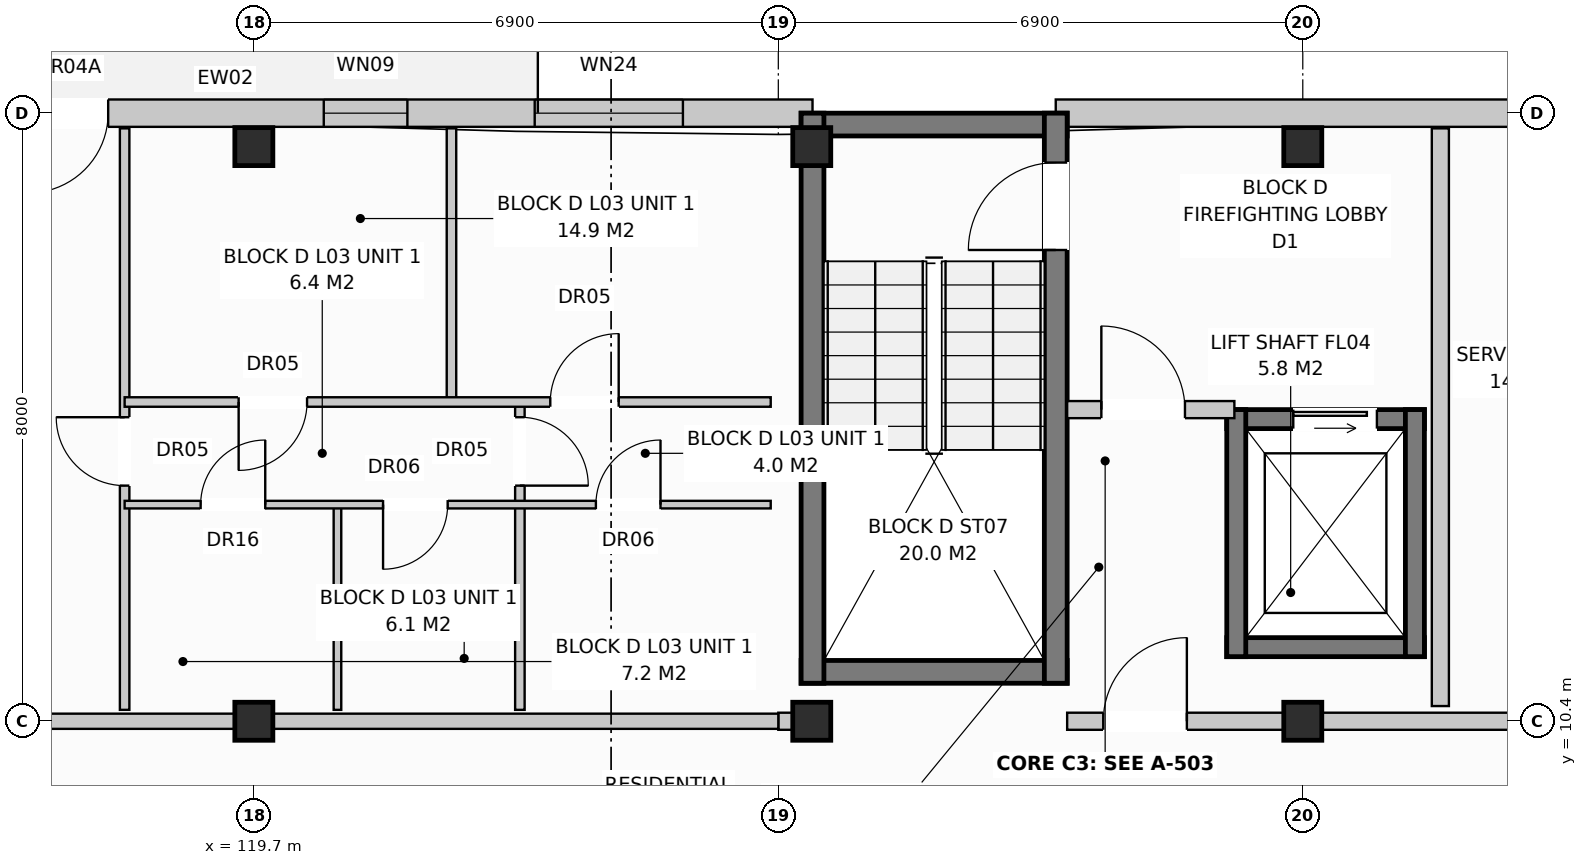
"""IFC4 building model, lengths in metres.
Left out: names, types, materials, properties, quantities, classifications, styles, units other than length and angle.
Written with IfcOpenShell. Run it as: python <this file> out.ifc"""

import sys

from ifc_helpers import new_model, si_unit, direction, frame, frame_2d, origin, origin_with_axes, origin_2d, place, context, subcontext, project, spatial, rectangle, extrude, element, fill, save


model = new_model("IFC4")
c1 = context("Model", 3, precision=1e-05, world=origin(), true_north=direction((0.0, 1.0)))
c2 = subcontext(c1, "Body", "Model", "MODEL_VIEW")
j1 = project(units=[si_unit("LENGTHUNIT", "METRE"), si_unit("PLANEANGLEUNIT", "RADIAN")], contexts=[c1])
p1 = place(None, origin())
s1 = spatial("IfcSite", under=j1, at=p1, CompositionType="ELEMENT")
p2 = place(p1, origin())
s2 = spatial("IfcBuilding", under=s1, at=p2, CompositionType="ELEMENT")
p3 = place(p2, frame((0.0, 0.0, 11.2)))
s3 = spatial("IfcBuildingStorey", under=s2, at=p3, CompositionType="ELEMENT", Elevation=11.2)
for number, where, z_axis, x_axis in (
    (1, (119.7, 10.4, 0.0), (0.0, 0.0, 1.0), (1.0, 0.0, 0.0)),
    (2, (119.7, 17.96, 0.0), (0.0, 0.0, 1.0), (1.0, 0.0, 0.0)),
    (3, (127.04, 10.4, 0.0), (0.0, 0.0, 1.0), (1.0, 0.0, 0.0)),
    (4, (127.04, 17.96, 0.0), (0.0, 0.0, 1.0), (1.0, 0.0, 0.0)),
    (5, (133.5, 10.4, 0.0), (0.0, 0.0, 1.0), (1.0, 0.0, 0.0)),
    (6, (133.5, 17.96, 0.0), (0.0, 0.0, 1.0), (1.0, 0.0, 0.0)),
):
    element("IfcColumn", number, at=place(p3, frame(where, z_axis=z_axis, x_axis=x_axis)), inside=s3, PredefinedType="COLUMN", context=c2, shape_type="SweptSolid", body=[
        extrude(rectangle(XDim=0.5, YDim=0.5, at=origin_2d()), origin(), (0.0, 0.0, 1.0), 3.2),
    ])
p4 = place(p3, frame((112.97, 18.4, 0.0), z_axis=(0.0, 0.0, 1.0), x_axis=(1.0, 0.0, 0.0)))
e7 = element("IfcWall", 7, at=p4, inside=s3, PredefinedType="STANDARD", context=c2, shape_type="SweptSolid", body=[
    extrude(rectangle(XDim=14.08, YDim=0.36, at=frame_2d((7.04, 0.0))), origin(), (0.0, 0.0, 1.0), 2.94),
])
p5 = place(p4, frame((3.764, 0.0, 0.0)))
e8 = element("IfcOpeningElement", 8, at=p5, cuts=e7, PredefinedType="OPENING", context=c2, shape_type="SweptSolid", body=[
    extrude(rectangle(XDim=1.05, YDim=2.12, at=frame_2d((0.525, 1.06))), frame((0.0, 0.192, 0.0), z_axis=(0.0, -1.0, 0.0), x_axis=(1.0, 0.0, 0.0)), (0.0, 0.0, 1.0), 0.384),
])
p6 = place(p4, frame((1.6, 0.0, 0.8)))
e9 = element("IfcOpeningElement", 9, at=p6, cuts=e7, PredefinedType="OPENING", context=c2, shape_type="SweptSolid", body=[
    extrude(rectangle(XDim=1.8, YDim=1.7, at=frame_2d((0.9, 0.85))), frame((0.0, 0.192, 0.0), z_axis=(0.0, -1.0, 0.0), x_axis=(1.0, 0.0, 0.0)), (0.0, 0.0, 1.0), 0.384),
])
p7 = place(p4, frame((7.65, 0.0, 0.72)))
e10 = element("IfcOpeningElement", 10, at=p7, cuts=e7, PredefinedType="OPENING", context=c2, shape_type="SweptSolid", body=[
    extrude(rectangle(XDim=1.1, YDim=1.5, at=frame_2d((0.55, 0.75))), frame((0.0, 0.192, 0.0), z_axis=(0.0, -1.0, 0.0), x_axis=(1.0, 0.0, 0.0)), (0.0, 0.0, 1.0), 0.384),
])
p8 = place(p4, frame((10.425, 0.0, 0.8)))
e11 = element("IfcOpeningElement", 11, at=p8, cuts=e7, PredefinedType="OPENING", context=c2, shape_type="SweptSolid", body=[
    extrude(rectangle(XDim=1.95, YDim=1.65, at=frame_2d((0.975, 0.825))), frame((0.0, 0.192, 0.0), z_axis=(0.0, -1.0, 0.0), x_axis=(1.0, 0.0, 0.0)), (0.0, 0.0, 1.0), 0.384),
])
p9 = place(p3, frame((130.25, 18.4, 0.0), z_axis=(0.0, 0.0, 1.0), x_axis=(1.0, 0.0, 0.0)))
e12 = element("IfcWall", 12, at=p9, inside=s3, PredefinedType="STANDARD", context=c2, shape_type="SweptSolid", body=[
    extrude(rectangle(XDim=17.5, YDim=0.36, at=frame_2d((8.75, 0.0))), origin(), (0.0, 0.0, 1.0), 2.94),
])
p10 = place(p9, frame((11.949, 0.0, 0.0)))
e13 = element("IfcOpeningElement", 13, at=p10, cuts=e12, PredefinedType="OPENING", context=c2, shape_type="SweptSolid", body=[
    extrude(rectangle(XDim=1.05, YDim=2.12, at=frame_2d((0.525, 1.06))), frame((0.0, 0.192, 0.0), z_axis=(0.0, -1.0, 0.0), x_axis=(1.0, 0.0, 0.0)), (0.0, 0.0, 1.0), 0.384),
])
p11 = place(p9, frame((14.97, 0.0, 0.72)))
e14 = element("IfcOpeningElement", 14, at=p11, cuts=e12, PredefinedType="OPENING", context=c2, shape_type="SweptSolid", body=[
    extrude(rectangle(XDim=1.1, YDim=1.5, at=frame_2d((0.55, 0.75))), frame((0.0, 0.192, 0.0), z_axis=(0.0, -1.0, 0.0), x_axis=(1.0, 0.0, 0.0)), (0.0, 0.0, 1.0), 0.384),
])
for number, where, z_axis, x_axis in (
    (15, (126.9, 18.25, 0.0), (0.0, 0.0, 1.0), (1.0, 0.0, 0.0)),
    (16, (126.9, 11.05, 0.0), (0.0, 0.0, 1.0), (1.0, 0.0, 0.0)),
):
    element("IfcWall", number, at=place(p3, frame(where, z_axis=z_axis, x_axis=x_axis)), inside=s3, PredefinedType="SHEAR", context=c2, shape_type="SweptSolid", body=[
        extrude(rectangle(XDim=3.5, YDim=0.3, at=frame_2d((1.75, 0.0))), origin(), (0.0, 0.0, 1.0), 2.94),
    ])
p12 = place(p3, frame((127.05, 10.9, 0.0), z_axis=(0.0, 0.0, 1.0), x_axis=(0.0, 1.0, 0.0)))
e17 = element("IfcWall", 17, at=p12, inside=s3, PredefinedType="SHEAR", context=c2, shape_type="SweptSolid", body=[
    extrude(rectangle(XDim=7.5, YDim=0.3, at=frame_2d((3.75, 0.0))), origin(), (0.0, 0.0, 1.0), 2.94),
])
p13 = place(p3, frame((130.25, 10.9, 0.0), z_axis=(0.0, 0.0, 1.0), x_axis=(0.0, 1.0, 0.0)))
e18 = element("IfcWall", 18, at=p13, inside=s3, PredefinedType="SHEAR", context=c2, shape_type="SweptSolid", body=[
    extrude(rectangle(XDim=7.5, YDim=0.3, at=frame_2d((3.75, 0.0))), origin(), (0.0, 0.0, 1.0), 2.94),
])
p14 = place(p13, frame((5.7, 0.0, 0.0)))
e19 = element("IfcOpeningElement", 19, at=p14, cuts=e18, PredefinedType="OPENING", context=c2, shape_type="SweptSolid", body=[
    extrude(rectangle(XDim=1.15, YDim=2.15, at=frame_2d((0.575, 1.075))), frame((0.0, 0.162, 0.0), z_axis=(0.0, -1.0, 0.0), x_axis=(1.0, 0.0, 0.0)), (0.0, 0.0, 1.0), 0.324),
])
p15 = place(p3, frame((132.5, 14.375, 0.0), z_axis=(0.0, 0.0, 1.0), x_axis=(1.0, 0.0, 0.0)))
e20 = element("IfcWall", 20, at=p15, inside=s3, PredefinedType="SHEAR", context=c2, shape_type="SweptSolid", body=[
    extrude(rectangle(XDim=2.6, YDim=0.25, at=frame_2d((1.3, 0.0))), origin(), (0.0, 0.0, 1.0), 2.94),
])
p16 = place(p15, frame((0.875, 0.0, 0.0)))
e21 = element("IfcOpeningElement", 21, at=p16, cuts=e20, PredefinedType="OPENING", context=c2, shape_type="SweptSolid", body=[
    extrude(rectangle(XDim=1.1, YDim=2.1, at=frame_2d((0.55, 1.05))), frame((0.0, 0.137, 0.0), z_axis=(0.0, -1.0, 0.0), x_axis=(1.0, 0.0, 0.0)), (0.0, 0.0, 1.0), 0.274),
])
p17 = place(p3, frame((132.5, 11.375, 0.0), z_axis=(0.0, 0.0, 1.0), x_axis=(1.0, 0.0, 0.0)))
e22 = element("IfcWall", 22, at=p17, inside=s3, PredefinedType="SHEAR", context=c2, shape_type="SweptSolid", body=[
    extrude(rectangle(XDim=2.6, YDim=0.25, at=frame_2d((1.3, 0.0))), origin(), (0.0, 0.0, 1.0), 2.94),
])
for number, where, z_axis, x_axis in (
    (23, (132.625, 11.25, 0.0), (0.0, 0.0, 1.0), (0.0, 1.0, 0.0)),
    (24, (134.975, 11.25, 0.0), (0.0, 0.0, 1.0), (0.0, 1.0, 0.0)),
):
    element("IfcWall", number, at=place(p3, frame(where, z_axis=z_axis, x_axis=x_axis)), inside=s3, PredefinedType="SHEAR", context=c2, shape_type="SweptSolid", body=[
        extrude(rectangle(XDim=3.25, YDim=0.25, at=frame_2d((1.625, 0.0))), origin(), (0.0, 0.0, 1.0), 2.94),
    ])
p18 = place(p3, frame((135.31, 10.6, 0.0), z_axis=(0.0, 0.0, 1.0), x_axis=(0.0, 1.0, 0.0)))
e25 = element("IfcWall", 25, at=p18, inside=s3, PredefinedType="PARTITIONING", context=c2, shape_type="SweptSolid", body=[
    extrude(rectangle(XDim=7.6, YDim=0.225, at=frame_2d((3.8, 0.0))), origin(), (0.0, 0.0, 1.0), 2.59),
])
p19 = place(p3, frame((130.4, 14.5, 0.0), z_axis=(0.0, 0.0, 1.0), x_axis=(1.0, 0.0, 0.0)))
e26 = element("IfcWall", 26, at=p19, inside=s3, PredefinedType="PARTITIONING", context=c2, shape_type="SweptSolid", body=[
    extrude(rectangle(XDim=2.2, YDim=0.225, at=frame_2d((1.1, 0.0))), origin(), (0.0, 0.0, 1.0), 2.94),
])
p20 = place(p19, frame((0.45, 0.0, 0.0)))
e27 = element("IfcOpeningElement", 27, at=p20, cuts=e26, PredefinedType="OPENING", context=c2, shape_type="SweptSolid", body=[
    extrude(rectangle(XDim=1.1, YDim=2.15, at=frame_2d((0.55, 1.075))), frame((0.0, 0.125, 0.0), z_axis=(0.0, -1.0, 0.0), x_axis=(1.0, 0.0, 0.0)), (0.0, 0.0, 1.0), 0.249),
])
p21 = place(p3, frame((126.6, 10.4, 0.0), z_axis=(0.0, 0.0, 1.0), x_axis=(1.0, 0.0, 0.0)))
e28 = element("IfcWall", 28, at=p21, inside=s3, PredefinedType="PARTITIONING", context=c2, shape_type="SweptSolid", body=[
    extrude(rectangle(XDim=0.3, YDim=0.225, at=frame_2d((0.15, 0.0))), origin(), (0.0, 0.0, 1.0), 2.94),
])
p22 = place(p3, frame((130.4, 10.4, 0.0), z_axis=(0.0, 0.0, 1.0), x_axis=(1.0, 0.0, 0.0)))
e29 = element("IfcWall", 29, at=p22, inside=s3, PredefinedType="PARTITIONING", context=c2, shape_type="SweptSolid", body=[
    extrude(rectangle(XDim=10.0, YDim=0.225, at=frame_2d((5.0, 0.0))), origin(), (0.0, 0.0, 1.0), 2.38),
])
p23 = place(p22, frame((0.475, 0.0, 0.0)))
e30 = element("IfcOpeningElement", 30, at=p23, cuts=e29, PredefinedType="OPENING", context=c2, shape_type="SweptSolid", body=[
    extrude(rectangle(XDim=1.1, YDim=2.15, at=frame_2d((0.55, 1.075))), frame((0.0, 0.125, 0.0), z_axis=(0.0, -1.0, 0.0), x_axis=(1.0, 0.0, 0.0)), (0.0, 0.0, 1.0), 0.249),
])
p24 = place(p22, frame((5.85, 0.0, 0.0)))
e31 = element("IfcOpeningElement", 31, at=p24, cuts=e29, PredefinedType="OPENING", context=c2, shape_type="SweptSolid", body=[
    extrude(rectangle(XDim=0.9, YDim=2.1, at=frame_2d((0.45, 1.05))), frame((0.0, 0.125, 0.0), z_axis=(0.0, -1.0, 0.0), x_axis=(1.0, 0.0, 0.0)), (0.0, 0.0, 1.0), 0.249),
])
p25 = place(p22, frame((7.9, 0.0, 0.0)))
e32 = element("IfcOpeningElement", 32, at=p25, cuts=e29, PredefinedType="OPENING", context=c2, shape_type="SweptSolid", body=[
    extrude(rectangle(XDim=0.95, YDim=2.15, at=frame_2d((0.475, 1.075))), frame((0.0, 0.125, 0.0), z_axis=(0.0, -1.0, 0.0), x_axis=(1.0, 0.0, 0.0)), (0.0, 0.0, 1.0), 0.249),
])
p26 = place(p3, frame((112.8, 10.4, 0.0), z_axis=(0.0, 0.0, 1.0), x_axis=(1.0, 0.0, 0.0)))
e33 = element("IfcWall", 33, at=p26, inside=s3, PredefinedType="PARTITIONING", context=c2, shape_type="SweptSolid", body=[
    extrude(rectangle(XDim=13.8, YDim=0.2, at=frame_2d((6.9, 0.0))), origin(), (0.0, 0.0, 1.0), 2.38),
])
p27 = place(p26, frame((2.4, 0.0, 0.0)))
e34 = element("IfcOpeningElement", 34, at=p27, cuts=e33, PredefinedType="OPENING", context=c2, shape_type="SweptSolid", body=[
    extrude(rectangle(XDim=0.95, YDim=2.15, at=frame_2d((0.475, 1.075))), frame((0.0, 0.112, 0.0), z_axis=(0.0, -1.0, 0.0), x_axis=(1.0, 0.0, 0.0)), (0.0, 0.0, 1.0), 0.224),
])
p28 = place(p3, frame((118.0, 10.55, 0.0), z_axis=(0.0, 0.0, 1.0), x_axis=(0.0, 1.0, 0.0)))
e35 = element("IfcWall", 35, at=p28, inside=s3, PredefinedType="PARTITIONING", context=c2, shape_type="SweptSolid", body=[
    extrude(rectangle(XDim=7.65, YDim=0.125, at=frame_2d((3.825, 0.0))), origin(), (0.0, 0.0, 1.0), 2.94),
])
p29 = place(p28, frame((2.95, 0.0, 0.0)))
e36 = element("IfcOpeningElement", 36, at=p29, cuts=e35, PredefinedType="OPENING", context=c2, shape_type="SweptSolid", body=[
    extrude(rectangle(XDim=0.9, YDim=2.1, at=frame_2d((0.45, 1.05))), frame((0.0, 0.074, 0.0), z_axis=(0.0, -1.0, 0.0), x_axis=(1.0, 0.0, 0.0)), (0.0, 0.0, 1.0), 0.149),
])
p30 = place(p3, frame((120.8, 10.55, 0.0), z_axis=(0.0, 0.0, 1.0), x_axis=(0.0, 1.0, 0.0)))
e37 = element("IfcWall", 37, at=p30, inside=s3, PredefinedType="PARTITIONING", context=c2, shape_type="SweptSolid", body=[
    extrude(rectangle(XDim=2.7, YDim=0.1, at=frame_2d((1.35, 0.0))), origin(), (0.0, 0.0, 1.0), 2.94),
])
p31 = place(p3, frame((123.2, 10.55, 0.0), z_axis=(0.0, 0.0, 1.0), x_axis=(0.0, 1.0, 0.0)))
e38 = element("IfcWall", 38, at=p31, inside=s3, PredefinedType="PARTITIONING", context=c2, shape_type="SweptSolid", body=[
    extrude(rectangle(XDim=4.05, YDim=0.125, at=frame_2d((2.025, 0.0))), origin(), (0.0, 0.0, 1.0), 2.94),
])
p32 = place(p31, frame((2.95, 0.0, 0.0)))
e39 = element("IfcOpeningElement", 39, at=p32, cuts=e38, PredefinedType="OPENING", context=c2, shape_type="SweptSolid", body=[
    extrude(rectangle(XDim=0.9, YDim=2.1, at=frame_2d((0.45, 1.05))), frame((0.0, 0.074, 0.0), z_axis=(0.0, -1.0, 0.0), x_axis=(1.0, 0.0, 0.0)), (0.0, 0.0, 1.0), 0.149),
])
p33 = place(p3, frame((122.3, 14.6, 0.0), z_axis=(0.0, 0.0, 1.0), x_axis=(0.0, 1.0, 0.0)))
e40 = element("IfcWall", 40, at=p33, inside=s3, PredefinedType="PARTITIONING", context=c2, shape_type="SweptSolid", body=[
    extrude(rectangle(XDim=3.6, YDim=0.125, at=frame_2d((1.8, 0.0))), origin(), (0.0, 0.0, 1.0), 2.59),
])
p34 = place(p3, frame((118.0, 13.25, 0.0), z_axis=(0.0, 0.0, 1.0), x_axis=(1.0, 0.0, 0.0)))
e41 = element("IfcWall", 41, at=p34, inside=s3, PredefinedType="PARTITIONING", context=c2, shape_type="SweptSolid", body=[
    extrude(rectangle(XDim=8.5, YDim=0.1, at=frame_2d((4.25, 0.0))), origin(), (0.0, 0.0, 1.0), 2.94),
])
p35 = place(p34, frame((1.0, 0.0, 0.0)))
e42 = element("IfcOpeningElement", 42, at=p35, cuts=e41, PredefinedType="OPENING", context=c2, shape_type="SweptSolid", body=[
    extrude(rectangle(XDim=0.85, YDim=2.1, at=frame_2d((0.425, 1.05))), frame((0.0, 0.062, 0.0), z_axis=(0.0, -1.0, 0.0), x_axis=(1.0, 0.0, 0.0)), (0.0, 0.0, 1.0), 0.124),
])
p36 = place(p34, frame((3.4, 0.0, 0.0)))
e43 = element("IfcOpeningElement", 43, at=p36, cuts=e41, PredefinedType="OPENING", context=c2, shape_type="SweptSolid", body=[
    extrude(rectangle(XDim=0.85, YDim=2.05, at=frame_2d((0.425, 1.025))), frame((0.0, 0.062, 0.0), z_axis=(0.0, -1.0, 0.0), x_axis=(1.0, 0.0, 0.0)), (0.0, 0.0, 1.0), 0.124),
])
p37 = place(p34, frame((6.2, 0.0, 0.0)))
e44 = element("IfcOpeningElement", 44, at=p37, cuts=e41, PredefinedType="OPENING", context=c2, shape_type="SweptSolid", body=[
    extrude(rectangle(XDim=0.85, YDim=2.05, at=frame_2d((0.425, 1.025))), frame((0.0, 0.062, 0.0), z_axis=(0.0, -1.0, 0.0), x_axis=(1.0, 0.0, 0.0)), (0.0, 0.0, 1.0), 0.124),
])
p38 = place(p3, frame((118.0, 14.6, 0.0), z_axis=(0.0, 0.0, 1.0), x_axis=(1.0, 0.0, 0.0)))
e45 = element("IfcWall", 45, at=p38, inside=s3, PredefinedType="PARTITIONING", context=c2, shape_type="SweptSolid", body=[
    extrude(rectangle(XDim=8.5, YDim=0.125, at=frame_2d((4.25, 0.0))), origin(), (0.0, 0.0, 1.0), 2.94),
])
p39 = place(p38, frame((1.5, 0.0, 0.0)))
e46 = element("IfcOpeningElement", 46, at=p39, cuts=e45, PredefinedType="OPENING", context=c2, shape_type="SweptSolid", body=[
    extrude(rectangle(XDim=0.9, YDim=2.1, at=frame_2d((0.45, 1.05))), frame((0.0, 0.074, 0.0), z_axis=(0.0, -1.0, 0.0), x_axis=(1.0, 0.0, 0.0)), (0.0, 0.0, 1.0), 0.149),
])
p40 = place(p38, frame((5.6, 0.0, 0.0)))
e47 = element("IfcOpeningElement", 47, at=p40, cuts=e45, PredefinedType="OPENING", context=c2, shape_type="SweptSolid", body=[
    extrude(rectangle(XDim=0.9, YDim=2.1, at=frame_2d((0.45, 1.05))), frame((0.0, 0.074, 0.0), z_axis=(0.0, -1.0, 0.0), x_axis=(1.0, 0.0, 0.0)), (0.0, 0.0, 1.0), 0.149),
])
p41 = place(p5, frame((1.05, 0.0, 0.0), z_axis=(0.0, 0.0, 1.0), x_axis=(-1.0, 0.0, 0.0)))
e48 = element("IfcDoor", 48, at=p41, inside=s3, OperationType="SINGLE_SWING_LEFT", PredefinedType="DOOR", context=c2, shape_type="SweptSolid", body=[
    extrude(rectangle(XDim=1.05, YDim=2.12, at=frame_2d((0.525, 1.06))), frame((0.0, 0.025, 0.0), z_axis=(0.0, -1.0, 0.0), x_axis=(1.0, 0.0, 0.0)), (0.0, 0.0, 1.0), 0.05),
])
fill(e8, e48)
p42 = place(p7, origin_with_axes())
e49 = element("IfcWindow", 49, at=p42, inside=s3, PartitioningType="SINGLE_PANEL", PredefinedType="WINDOW", context=c2, shape_type="SweptSolid", body=[
    extrude(rectangle(XDim=1.1, YDim=1.5, at=frame_2d((0.55, 0.75))), frame((0.0, 0.03, 0.0), z_axis=(0.0, -1.0, 0.0), x_axis=(1.0, 0.0, 0.0)), (0.0, 0.0, 1.0), 0.06),
])
fill(e10, e49)
p43 = place(p8, origin_with_axes())
e50 = element("IfcWindow", 50, at=p43, inside=s3, PartitioningType="SINGLE_PANEL", PredefinedType="WINDOW", context=c2, shape_type="SweptSolid", body=[
    extrude(rectangle(XDim=1.95, YDim=1.65, at=frame_2d((0.975, 0.825))), frame((0.0, 0.03, 0.0), z_axis=(0.0, -1.0, 0.0), x_axis=(1.0, 0.0, 0.0)), (0.0, 0.0, 1.0), 0.06),
])
fill(e11, e50)
p44 = place(p14, origin_with_axes())
e51 = element("IfcDoor", 51, at=p44, inside=s3, OperationType="SINGLE_SWING_LEFT", PredefinedType="DOOR", context=c2, shape_type="SweptSolid", body=[
    extrude(rectangle(XDim=1.15, YDim=2.15, at=frame_2d((0.575, 1.075))), frame((0.0, 0.025, 0.0), z_axis=(0.0, -1.0, 0.0), x_axis=(1.0, 0.0, 0.0)), (0.0, 0.0, 1.0), 0.05),
])
fill(e19, e51)
p45 = place(p16, origin_with_axes())
e52 = element("IfcDoor", 52, at=p45, inside=s3, OperationType="SLIDING_TO_LEFT", PredefinedType="DOOR", context=c2, shape_type="SweptSolid", body=[
    extrude(rectangle(XDim=1.1, YDim=2.1, at=frame_2d((0.55, 1.05))), frame((0.0, 0.025, 0.0), z_axis=(0.0, -1.0, 0.0), x_axis=(1.0, 0.0, 0.0)), (0.0, 0.0, 1.0), 0.05),
])
fill(e21, e52)
p46 = place(p20, origin_with_axes())
e53 = element("IfcDoor", 53, at=p46, inside=s3, OperationType="SINGLE_SWING_LEFT", PredefinedType="DOOR", context=c2, shape_type="SweptSolid", body=[
    extrude(rectangle(XDim=1.1, YDim=2.15, at=frame_2d((0.55, 1.075))), frame((0.0, 0.025, 0.0), z_axis=(0.0, -1.0, 0.0), x_axis=(1.0, 0.0, 0.0)), (0.0, 0.0, 1.0), 0.05),
])
fill(e27, e53)
p47 = place(p23, origin_with_axes())
e54 = element("IfcDoor", 54, at=p47, inside=s3, OperationType="SINGLE_SWING_RIGHT", PredefinedType="DOOR", context=c2, shape_type="SweptSolid", body=[
    extrude(rectangle(XDim=1.1, YDim=2.15, at=frame_2d((0.55, 1.075))), frame((0.0, 0.025, 0.0), z_axis=(0.0, -1.0, 0.0), x_axis=(1.0, 0.0, 0.0)), (0.0, 0.0, 1.0), 0.05),
])
fill(e30, e54)
p48 = place(p29, origin_with_axes())
e55 = element("IfcDoor", 55, at=p48, inside=s3, OperationType="SINGLE_SWING_RIGHT", PredefinedType="DOOR", context=c2, shape_type="SweptSolid", body=[
    extrude(rectangle(XDim=0.9, YDim=2.1, at=frame_2d((0.45, 1.05))), frame((0.0, 0.025, 0.0), z_axis=(0.0, -1.0, 0.0), x_axis=(1.0, 0.0, 0.0)), (0.0, 0.0, 1.0), 0.05),
])
fill(e36, e55)
p49 = place(p32, frame((0.9, 0.0, 0.0), z_axis=(0.0, 0.0, 1.0), x_axis=(-1.0, 0.0, 0.0)))
e56 = element("IfcDoor", 56, at=p49, inside=s3, OperationType="SINGLE_SWING_LEFT", PredefinedType="DOOR", context=c2, shape_type="SweptSolid", body=[
    extrude(rectangle(XDim=0.9, YDim=2.1, at=frame_2d((0.45, 1.05))), frame((0.0, 0.025, 0.0), z_axis=(0.0, -1.0, 0.0), x_axis=(1.0, 0.0, 0.0)), (0.0, 0.0, 1.0), 0.05),
])
fill(e39, e56)
p50 = place(p35, origin_with_axes())
e57 = element("IfcDoor", 57, at=p50, inside=s3, OperationType="SINGLE_SWING_RIGHT", PredefinedType="DOOR", context=c2, shape_type="SweptSolid", body=[
    extrude(rectangle(XDim=0.85, YDim=2.1, at=frame_2d((0.425, 1.05))), frame((0.0, 0.025, 0.0), z_axis=(0.0, -1.0, 0.0), x_axis=(1.0, 0.0, 0.0)), (0.0, 0.0, 1.0), 0.05),
])
fill(e42, e57)
p51 = place(p36, frame((0.85, 0.0, 0.0), z_axis=(0.0, 0.0, 1.0), x_axis=(-1.0, 0.0, 0.0)))
e58 = element("IfcDoor", 58, at=p51, inside=s3, OperationType="SINGLE_SWING_LEFT", PredefinedType="DOOR", context=c2, shape_type="SweptSolid", body=[
    extrude(rectangle(XDim=0.85, YDim=2.05, at=frame_2d((0.425, 1.025))), frame((0.0, 0.025, 0.0), z_axis=(0.0, -1.0, 0.0), x_axis=(1.0, 0.0, 0.0)), (0.0, 0.0, 1.0), 0.05),
])
fill(e43, e58)
p52 = place(p37, origin_with_axes())
e59 = element("IfcDoor", 59, at=p52, inside=s3, OperationType="SINGLE_SWING_RIGHT", PredefinedType="DOOR", context=c2, shape_type="SweptSolid", body=[
    extrude(rectangle(XDim=0.85, YDim=2.05, at=frame_2d((0.425, 1.025))), frame((0.0, 0.025, 0.0), z_axis=(0.0, -1.0, 0.0), x_axis=(1.0, 0.0, 0.0)), (0.0, 0.0, 1.0), 0.05),
])
fill(e44, e59)
p53 = place(p39, frame((0.9, 0.0, 0.0), z_axis=(0.0, 0.0, 1.0), x_axis=(-1.0, 0.0, 0.0)))
e60 = element("IfcDoor", 60, at=p53, inside=s3, OperationType="SINGLE_SWING_LEFT", PredefinedType="DOOR", context=c2, shape_type="SweptSolid", body=[
    extrude(rectangle(XDim=0.9, YDim=2.1, at=frame_2d((0.45, 1.05))), frame((0.0, 0.025, 0.0), z_axis=(0.0, -1.0, 0.0), x_axis=(1.0, 0.0, 0.0)), (0.0, 0.0, 1.0), 0.05),
])
fill(e46, e60)
p54 = place(p40, origin_with_axes())
e61 = element("IfcDoor", 61, at=p54, inside=s3, OperationType="SINGLE_SWING_RIGHT", PredefinedType="DOOR", context=c2, shape_type="SweptSolid", body=[
    extrude(rectangle(XDim=0.9, YDim=2.1, at=frame_2d((0.45, 1.05))), frame((0.0, 0.025, 0.0), z_axis=(0.0, -1.0, 0.0), x_axis=(1.0, 0.0, 0.0)), (0.0, 0.0, 1.0), 0.05),
])
fill(e47, e61)
save(model, sys.argv[1])
